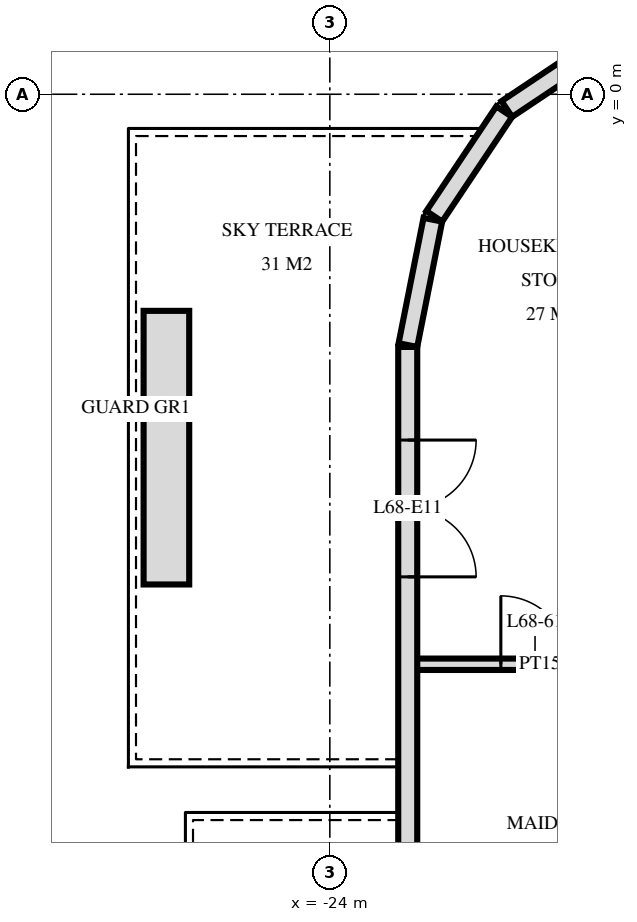
"""IFC4 building model, lengths in metres.
Left out: names, types, materials, properties, quantities, classifications, styles, units other than length and angle.
Written with IfcOpenShell. Run it as: python <this file> out.ifc"""

import sys

from ifc_helpers import new_model, si_unit, direction, frame, frame_2d, origin, place, context, subcontext, project, spatial, rectangle, extrude, element, fill, save


model = new_model("IFC4")
c1 = context("Model", 3, precision=1e-05, world=origin(), true_north=direction((0.0, 1.0)))
c2 = subcontext(c1, "Body", "Model", "MODEL_VIEW")
j1 = project(units=[si_unit("LENGTHUNIT", "METRE"), si_unit("PLANEANGLEUNIT", "RADIAN")], contexts=[c1])
p1 = place(None, origin())
s1 = spatial("IfcSite", under=j1, at=p1, CompositionType="ELEMENT")
p2 = place(p1, origin())
s2 = spatial("IfcBuilding", under=s1, at=p2, CompositionType="ELEMENT")
p3 = place(p2, frame((0.0, 0.0, 259.6)))
s3 = spatial("IfcBuildingStorey", under=s2, at=p3, CompositionType="ELEMENT", Elevation=259.6)
for number, where, z_axis, x_axis in (
    (1, (-20.294, 0.726, 0.0), (0.0, 0.0, 1.0), (-0.831, -0.556, 0.0)),
    (2, (-21.706, -0.229, 0.0), (0.0, 0.0, 1.0), (-0.556, -0.831, 0.0)),
):
    element("IfcWall", number, at=place(p3, frame(where, z_axis=z_axis, x_axis=x_axis)), inside=s3, PredefinedType="SOLIDWALL", context=c2, shape_type="SweptSolid", body=[
        extrude(rectangle(XDim=1.656, YDim=0.25, at=frame_2d((0.828, 0.0))), origin(), (0.0, 0.0, 1.0), 3.22),
    ])
p4 = place(p3, frame((-22.645, -1.651, 0.0), z_axis=(0.0, 0.0, 1.0), x_axis=(-0.19513878023, -0.980775640221, 0.0)))
e3 = element("IfcWall", 3, at=p4, inside=s3, PredefinedType="SOLIDWALL", context=c2, shape_type="SweptSolid", body=[
    extrude(rectangle(XDim=1.681, YDim=0.25, at=frame_2d((0.841, 0.0))), origin(), (0.0, 0.0, 1.0), 3.22),
])
p5 = place(p3, frame((-22.975, -3.325, 0.0), z_axis=(0.0, 0.0, 1.0), x_axis=(0.0, -1.0, 0.0)))
e4 = element("IfcWall", 4, at=p5, inside=s3, PredefinedType="SOLIDWALL", context=c2, shape_type="SweptSolid", body=[
    extrude(rectangle(XDim=25.951, YDim=0.25, at=frame_2d((12.975, 0.0))), origin(), (0.0, 0.0, 1.0), 3.22),
])
p6 = place(p5, frame((1.225, 0.0, 0.0)))
e5 = element("IfcOpeningElement", 5, at=p6, cuts=e4, PredefinedType="OPENING", context=c2, shape_type="SweptSolid", body=[
    extrude(rectangle(XDim=1.8, YDim=2.4, at=frame_2d((0.9, 1.2))), frame((0.0, 0.135, 0.0), z_axis=(0.0, -1.0, 0.0), x_axis=(1.0, 0.0, 0.0)), (0.0, 0.0, 1.0), 0.27),
])
p7 = place(p5, frame((7.975, 0.0, 0.0)))
e6 = element("IfcOpeningElement", 6, at=p7, cuts=e4, PredefinedType="OPENING", context=c2, shape_type="SweptSolid", body=[
    extrude(rectangle(XDim=1.8, YDim=2.4, at=frame_2d((0.9, 1.2))), frame((0.0, 0.135, 0.0), z_axis=(0.0, -1.0, 0.0), x_axis=(1.0, 0.0, 0.0)), (0.0, 0.0, 1.0), 0.27),
])
p8 = place(p5, frame((18.175, 0.0, 0.0)))
e7 = element("IfcOpeningElement", 7, at=p8, cuts=e4, PredefinedType="OPENING", context=c2, shape_type="SweptSolid", body=[
    extrude(rectangle(XDim=1.8, YDim=2.4, at=frame_2d((0.9, 1.2))), frame((0.0, 0.135, 0.0), z_axis=(0.0, -1.0, 0.0), x_axis=(1.0, 0.0, 0.0)), (0.0, 0.0, 1.0), 0.27),
])
p9 = place(p5, frame((21.075, 0.0, 0.0)))
e8 = element("IfcOpeningElement", 8, at=p9, cuts=e4, PredefinedType="OPENING", context=c2, shape_type="SweptSolid", body=[
    extrude(rectangle(XDim=1.8, YDim=2.4, at=frame_2d((0.9, 1.2))), frame((0.0, 0.135, 0.0), z_axis=(0.0, -1.0, 0.0), x_axis=(1.0, 0.0, 0.0)), (0.0, 0.0, 1.0), 0.27),
])
p10 = place(p5, frame((23.825, 0.0, 0.9)))
e9 = element("IfcOpeningElement", 9, at=p10, cuts=e4, PredefinedType="OPENING", context=c2, shape_type="SweptSolid", body=[
    extrude(rectangle(XDim=1.8, YDim=1.5, at=frame_2d((0.9, 0.75))), frame((0.0, 0.135, 0.0), z_axis=(0.0, -1.0, 0.0), x_axis=(1.0, 0.0, 0.0)), (0.0, 0.0, 1.0), 0.27),
])
p11 = place(p3, frame((-26.15, -6.45, 0.0), z_axis=(0.0, 0.0, 1.0), x_axis=(0.0, 1.0, 0.0)))
e10 = element("IfcWall", 10, at=p11, inside=s3, PredefinedType="USERDEFINED", context=c2, shape_type="SweptSolid", body=[
    extrude(rectangle(XDim=3.6, YDim=0.6, at=frame_2d((1.8, 0.0))), origin(), (0.0, 0.0, 1.0), 0.65),
])
p12 = place(p3, frame((-22.92, -7.5, 0.0), z_axis=(0.0, 0.0, 1.0), x_axis=(1.0, 0.0, 0.0)))
e11 = element("IfcWall", 11, at=p12, inside=s3, PredefinedType="PARTITIONING", context=c2, shape_type="SweptSolid", body=[
    extrude(rectangle(XDim=3.37, YDim=0.15, at=frame_2d((1.685, 0.0))), origin(), (0.0, 0.0, 1.0), 3.22),
])
p13 = place(p12, frame((1.17, 0.0, 0.0)))
e12 = element("IfcOpeningElement", 12, at=p13, cuts=e11, PredefinedType="OPENING", context=c2, shape_type="SweptSolid", body=[
    extrude(rectangle(XDim=0.9, YDim=2.1, at=frame_2d((0.45, 1.05))), frame((0.0, 0.085, 0.0), z_axis=(0.0, -1.0, 0.0), x_axis=(1.0, 0.0, 0.0)), (0.0, 0.0, 1.0), 0.17),
])
p14 = place(p6, origin())
e13 = element("IfcDoor", 13, at=p14, inside=s3, OperationType="DOUBLE_DOOR_SINGLE_SWING", PredefinedType="DOOR", context=c2, shape_type="SweptSolid", body=[
    extrude(rectangle(XDim=1.8, YDim=2.4, at=frame_2d((0.9, 1.2))), frame((0.0, 0.025, 0.0), z_axis=(0.0, -1.0, 0.0), x_axis=(1.0, 0.0, 0.0)), (0.0, 0.0, 1.0), 0.05),
])
fill(e5, e13)
p15 = place(p13, origin())
e14 = element("IfcDoor", 14, at=p15, inside=s3, OperationType="SINGLE_SWING_RIGHT", PredefinedType="DOOR", context=c2, shape_type="SweptSolid", body=[
    extrude(rectangle(XDim=0.9, YDim=2.1, at=frame_2d((0.45, 1.05))), frame((0.0, 0.025, 0.0), z_axis=(0.0, -1.0, 0.0), x_axis=(1.0, 0.0, 0.0)), (0.0, 0.0, 1.0), 0.05),
])
fill(e12, e14)
save(model, sys.argv[1])
